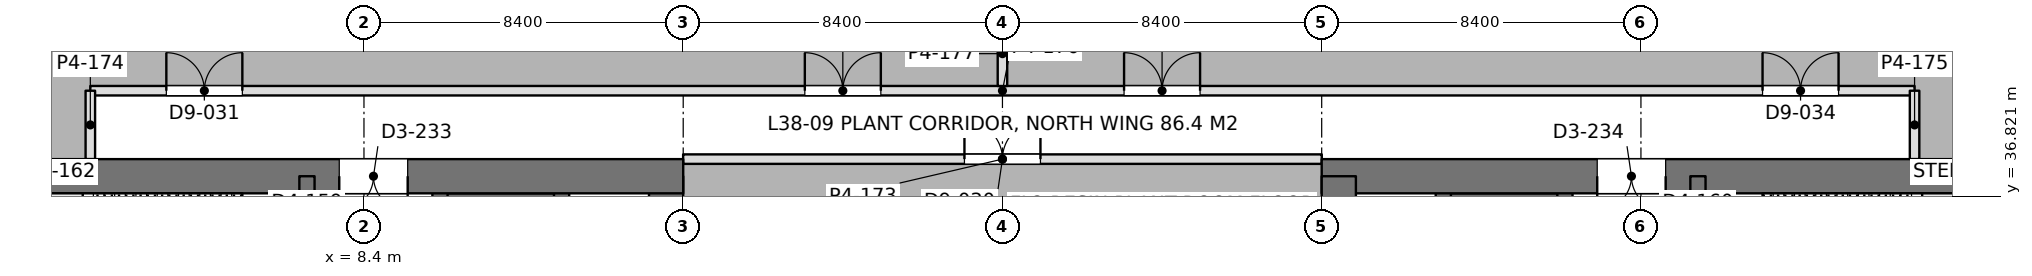
"""IFC4 building model, lengths in metres.
Left out: names, types, materials, properties, quantities, classifications, styles, units other than length and angle.
Written with IfcOpenShell. Run it as: python <this file> out.ifc"""

import sys

from ifc_helpers import new_model, si_unit, direction, frame, frame_2d, origin, place, context, subcontext, project, spatial, rectangle, extrude, element, fill, save


model = new_model("IFC4")
c1 = context("Model", 3, precision=1e-05, world=origin(), true_north=direction((0.0, 1.0)))
c2 = subcontext(c1, "Body", "Model", "MODEL_VIEW")
j1 = project(units=[si_unit("LENGTHUNIT", "METRE"), si_unit("PLANEANGLEUNIT", "RADIAN")], contexts=[c1])
p1 = place(None, origin())
s1 = spatial("IfcSite", under=j1, at=p1, CompositionType="ELEMENT")
p2 = place(p1, origin())
s2 = spatial("IfcBuilding", under=s1, at=p2, CompositionType="ELEMENT")
p3 = place(p2, frame((0.0, 0.0, 168.0)))
s3 = spatial("IfcBuildingStorey", under=s2, at=p3, CompositionType="ELEMENT", Elevation=168.0)
p4 = place(p3, frame((-1.2, 37.35, 0.0), z_axis=(0.0, 0.0, 1.0), x_axis=(1.0, 0.0, 0.0)))
e1 = element("IfcWall", 1, at=p4, inside=s3, PredefinedType="SHEAR", context=c2, shape_type="SweptSolid", body=[
    extrude(rectangle(XDim=18.0, YDim=0.9, at=frame_2d((9.0, 0.0))), origin(), (0.0, 0.0, 1.0), 5.4),
])
p5 = place(p4, frame((8.95, 0.0, 0.0)))
e2 = element("IfcOpeningElement", 2, at=p5, cuts=e1, PredefinedType="OPENING", context=c2, shape_type="SweptSolid", body=[
    extrude(rectangle(XDim=1.8, YDim=2.4, at=frame_2d((0.9, 1.2))), frame((0.0, 0.46, 0.0), z_axis=(0.0, -1.0, 0.0), x_axis=(1.0, 0.0, 0.0)), (0.0, 0.0, 1.0), 0.92),
])
p6 = place(p3, frame((16.35, 22.1, 0.0), z_axis=(0.0, 0.0, 1.0), x_axis=(0.0, 1.0, 0.0)))
e3 = element("IfcWall", 3, at=p6, inside=s3, PredefinedType="SHEAR", context=c2, shape_type="SweptSolid", body=[
    extrude(rectangle(XDim=15.25, YDim=0.9, at=frame_2d((7.625, 0.0))), origin(), (0.0, 0.0, 1.0), 5.4),
])
p7 = place(p3, frame((6.9, 13.05, 0.0), z_axis=(0.0, 0.0, 1.0), x_axis=(0.0, 1.0, 0.0)))
e4 = element("IfcWall", 4, at=p7, inside=s3, PredefinedType="SHEAR", context=c2, shape_type="SweptSolid", body=[
    extrude(rectangle(XDim=24.3, YDim=0.4, at=frame_2d((12.15, 0.0))), origin(), (0.0, 0.0, 1.0), 5.4),
])
p8 = place(p7, frame((1.3, 0.0, 0.0)))
e5 = element("IfcOpeningElement", 5, at=p8, cuts=e4, PredefinedType="OPENING", context=c2, shape_type="SweptSolid", body=[
    extrude(rectangle(XDim=1.0, YDim=2.2, at=frame_2d((0.5, 1.1))), frame((0.0, 0.21, 0.0), z_axis=(0.0, -1.0, 0.0), x_axis=(1.0, 0.0, 0.0)), (0.0, 0.0, 1.0), 0.42),
])
p9 = place(p7, frame((22.0, 0.0, 0.0)))
e6 = element("IfcOpeningElement", 6, at=p9, cuts=e4, PredefinedType="OPENING", context=c2, shape_type="SweptSolid", body=[
    extrude(rectangle(XDim=1.0, YDim=2.2, at=frame_2d((0.5, 1.1))), frame((0.0, 0.21, 0.0), z_axis=(0.0, -1.0, 0.0), x_axis=(1.0, 0.0, 0.0)), (0.0, 0.0, 1.0), 0.42),
])
p10 = place(p7, frame((5.55, 0.0, 0.0)))
e7 = element("IfcOpeningElement", 7, at=p10, cuts=e4, PredefinedType="OPENING", context=c2, shape_type="SweptSolid", body=[
    extrude(rectangle(XDim=1.0, YDim=2.2, at=frame_2d((0.5, 1.1))), frame((0.0, 0.21, 0.0), z_axis=(0.0, -1.0, 0.0), x_axis=(1.0, 0.0, 0.0)), (0.0, 0.0, 1.0), 0.42),
])
p11 = place(p7, frame((9.55, 0.0, 0.0)))
e8 = element("IfcOpeningElement", 8, at=p11, cuts=e4, PredefinedType="OPENING", context=c2, shape_type="SweptSolid", body=[
    extrude(rectangle(XDim=1.0, YDim=2.2, at=frame_2d((0.5, 1.1))), frame((0.0, 0.21, 0.0), z_axis=(0.0, -1.0, 0.0), x_axis=(1.0, 0.0, 0.0)), (0.0, 0.0, 1.0), 0.42),
])
p12 = place(p7, frame((12.8, 0.0, 0.0)))
e9 = element("IfcOpeningElement", 9, at=p12, cuts=e4, PredefinedType="OPENING", context=c2, shape_type="SweptSolid", body=[
    extrude(rectangle(XDim=1.1, YDim=2.2, at=frame_2d((0.55, 1.1))), frame((0.0, 0.21, 0.0), z_axis=(0.0, -1.0, 0.0), x_axis=(1.0, 0.0, 0.0)), (0.0, 0.0, 1.0), 0.42),
])
p13 = place(p7, frame((15.538, 0.0, 0.0)))
e10 = element("IfcOpeningElement", 10, at=p13, cuts=e4, PredefinedType="OPENING", context=c2, shape_type="SweptSolid", body=[
    extrude(rectangle(XDim=1.1, YDim=2.2, at=frame_2d((0.55, 1.1))), frame((0.0, 0.21, 0.0), z_axis=(0.0, -1.0, 0.0), x_axis=(1.0, 0.0, 0.0)), (0.0, 0.0, 1.0), 0.42),
])
p14 = place(p7, frame((18.262, 0.0, 0.0)))
e11 = element("IfcOpeningElement", 11, at=p14, cuts=e4, PredefinedType="OPENING", context=c2, shape_type="SweptSolid", body=[
    extrude(rectangle(XDim=1.1, YDim=2.2, at=frame_2d((0.55, 1.1))), frame((0.0, 0.21, 0.0), z_axis=(0.0, -1.0, 0.0), x_axis=(1.0, 0.0, 0.0)), (0.0, 0.0, 1.0), 0.42),
])
p15 = place(p3, frame((10.4, 13.05, 0.0), z_axis=(0.0, 0.0, 1.0), x_axis=(0.0, 1.0, 0.0)))
e12 = element("IfcWall", 12, at=p15, inside=s3, PredefinedType="SHEAR", context=c2, shape_type="SweptSolid", body=[
    extrude(rectangle(XDim=24.3, YDim=0.4, at=frame_2d((12.15, 0.0))), origin(), (0.0, 0.0, 1.0), 5.4),
])
p16 = place(p15, frame((10.05, 0.0, 0.0)))
e13 = element("IfcOpeningElement", 13, at=p16, cuts=e12, PredefinedType="OPENING", context=c2, shape_type="SweptSolid", body=[
    extrude(rectangle(XDim=1.1, YDim=2.2, at=frame_2d((0.55, 1.1))), frame((0.0, 0.21, 0.0), z_axis=(0.0, -1.0, 0.0), x_axis=(1.0, 0.0, 0.0)), (0.0, 0.0, 1.0), 0.42),
])
p17 = place(p15, frame((12.9, 0.0, 0.0)))
e14 = element("IfcOpeningElement", 14, at=p17, cuts=e12, PredefinedType="OPENING", context=c2, shape_type="SweptSolid", body=[
    extrude(rectangle(XDim=1.1, YDim=2.2, at=frame_2d((0.55, 1.1))), frame((0.0, 0.21, 0.0), z_axis=(0.0, -1.0, 0.0), x_axis=(1.0, 0.0, 0.0)), (0.0, 0.0, 1.0), 0.42),
])
p18 = place(p15, frame((21.45, 0.0, 0.0)))
e15 = element("IfcOpeningElement", 15, at=p18, cuts=e12, PredefinedType="OPENING", context=c2, shape_type="SweptSolid", body=[
    extrude(rectangle(XDim=1.1, YDim=2.2, at=frame_2d((0.55, 1.1))), frame((0.0, 0.21, 0.0), z_axis=(0.0, -1.0, 0.0), x_axis=(1.0, 0.0, 0.0)), (0.0, 0.0, 1.0), 0.42),
])
p19 = place(p15, frame((5.8, 0.0, 0.0)))
e16 = element("IfcOpeningElement", 16, at=p19, cuts=e12, PredefinedType="OPENING", context=c2, shape_type="SweptSolid", body=[
    extrude(rectangle(XDim=1.8, YDim=2.4, at=frame_2d((0.9, 1.2))), frame((0.0, 0.21, 0.0), z_axis=(0.0, -1.0, 0.0), x_axis=(1.0, 0.0, 0.0)), (0.0, 0.0, 1.0), 0.42),
])
p20 = place(p15, frame((1.05, 0.0, 0.0)))
e17 = element("IfcOpeningElement", 17, at=p20, cuts=e12, PredefinedType="OPENING", context=c2, shape_type="SweptSolid", body=[
    extrude(rectangle(XDim=1.8, YDim=2.4, at=frame_2d((0.9, 1.2))), frame((0.0, 0.21, 0.0), z_axis=(0.0, -1.0, 0.0), x_axis=(1.0, 0.0, 0.0)), (0.0, 0.0, 1.0), 0.42),
])
p21 = place(p3, frame((13.6, 22.225, 0.0), z_axis=(0.0, 0.0, 1.0), x_axis=(0.0, 1.0, 0.0)))
e18 = element("IfcWall", 18, at=p21, inside=s3, PredefinedType="SHEAR", context=c2, shape_type="SweptSolid", body=[
    extrude(rectangle(XDim=15.125, YDim=0.4, at=frame_2d((7.562, 0.0))), origin(), (0.0, 0.0, 1.0), 5.4),
])
p22 = place(p3, frame((10.4, 36.625, 0.0), z_axis=(0.0, 0.0, 1.0), x_axis=(1.0, 0.0, 0.0)))
e19 = element("IfcWall", 19, at=p22, inside=s3, PredefinedType="SHEAR", context=c2, shape_type="SweptSolid", body=[
    extrude(rectangle(XDim=3.2, YDim=0.55, at=frame_2d((1.6, 0.0))), origin(), (0.0, 0.0, 1.0), 5.4),
])
p23 = place(p3, frame((33.6, 37.35, 0.0), z_axis=(0.0, 0.0, 1.0), x_axis=(1.0, 0.0, 0.0)))
e20 = element("IfcWall", 20, at=p23, inside=s3, PredefinedType="SHEAR", context=c2, shape_type="SweptSolid", body=[
    extrude(rectangle(XDim=18.0, YDim=0.9, at=frame_2d((9.0, 0.0))), origin(), (0.0, 0.0, 1.0), 5.4),
])
p24 = place(p23, frame((7.25, 0.0, 0.0)))
e21 = element("IfcOpeningElement", 21, at=p24, cuts=e20, PredefinedType="OPENING", context=c2, shape_type="SweptSolid", body=[
    extrude(rectangle(XDim=1.8, YDim=2.4, at=frame_2d((0.9, 1.2))), frame((0.0, 0.46, 0.0), z_axis=(0.0, -1.0, 0.0), x_axis=(1.0, 0.0, 0.0)), (0.0, 0.0, 1.0), 0.92),
])
p25 = place(p3, frame((34.05, 22.1, 0.0), z_axis=(0.0, 0.0, 1.0), x_axis=(0.0, 1.0, 0.0)))
e22 = element("IfcWall", 22, at=p25, inside=s3, PredefinedType="SHEAR", context=c2, shape_type="SweptSolid", body=[
    extrude(rectangle(XDim=15.25, YDim=0.9, at=frame_2d((7.625, 0.0))), origin(), (0.0, 0.0, 1.0), 5.4),
])
p26 = place(p3, frame((43.5, 13.05, 0.0), z_axis=(0.0, 0.0, 1.0), x_axis=(0.0, 1.0, 0.0)))
e23 = element("IfcWall", 23, at=p26, inside=s3, PredefinedType="SHEAR", context=c2, shape_type="SweptSolid", body=[
    extrude(rectangle(XDim=24.3, YDim=0.4, at=frame_2d((12.15, 0.0))), origin(), (0.0, 0.0, 1.0), 5.4),
])
p27 = place(p26, frame((1.3, 0.0, 0.0)))
e24 = element("IfcOpeningElement", 24, at=p27, cuts=e23, PredefinedType="OPENING", context=c2, shape_type="SweptSolid", body=[
    extrude(rectangle(XDim=1.0, YDim=2.2, at=frame_2d((0.5, 1.1))), frame((0.0, 0.21, 0.0), z_axis=(0.0, -1.0, 0.0), x_axis=(1.0, 0.0, 0.0)), (0.0, 0.0, 1.0), 0.42),
])
p28 = place(p26, frame((22.0, 0.0, 0.0)))
e25 = element("IfcOpeningElement", 25, at=p28, cuts=e23, PredefinedType="OPENING", context=c2, shape_type="SweptSolid", body=[
    extrude(rectangle(XDim=1.0, YDim=2.2, at=frame_2d((0.5, 1.1))), frame((0.0, 0.21, 0.0), z_axis=(0.0, -1.0, 0.0), x_axis=(1.0, 0.0, 0.0)), (0.0, 0.0, 1.0), 0.42),
])
p29 = place(p26, frame((5.55, 0.0, 0.0)))
e26 = element("IfcOpeningElement", 26, at=p29, cuts=e23, PredefinedType="OPENING", context=c2, shape_type="SweptSolid", body=[
    extrude(rectangle(XDim=1.0, YDim=2.2, at=frame_2d((0.5, 1.1))), frame((0.0, 0.21, 0.0), z_axis=(0.0, -1.0, 0.0), x_axis=(1.0, 0.0, 0.0)), (0.0, 0.0, 1.0), 0.42),
])
p30 = place(p26, frame((9.55, 0.0, 0.0)))
e27 = element("IfcOpeningElement", 27, at=p30, cuts=e23, PredefinedType="OPENING", context=c2, shape_type="SweptSolid", body=[
    extrude(rectangle(XDim=1.0, YDim=2.2, at=frame_2d((0.5, 1.1))), frame((0.0, 0.21, 0.0), z_axis=(0.0, -1.0, 0.0), x_axis=(1.0, 0.0, 0.0)), (0.0, 0.0, 1.0), 0.42),
])
p31 = place(p26, frame((12.8, 0.0, 0.0)))
e28 = element("IfcOpeningElement", 28, at=p31, cuts=e23, PredefinedType="OPENING", context=c2, shape_type="SweptSolid", body=[
    extrude(rectangle(XDim=1.1, YDim=2.2, at=frame_2d((0.55, 1.1))), frame((0.0, 0.21, 0.0), z_axis=(0.0, -1.0, 0.0), x_axis=(1.0, 0.0, 0.0)), (0.0, 0.0, 1.0), 0.42),
])
p32 = place(p26, frame((15.538, 0.0, 0.0)))
e29 = element("IfcOpeningElement", 29, at=p32, cuts=e23, PredefinedType="OPENING", context=c2, shape_type="SweptSolid", body=[
    extrude(rectangle(XDim=1.1, YDim=2.2, at=frame_2d((0.55, 1.1))), frame((0.0, 0.21, 0.0), z_axis=(0.0, -1.0, 0.0), x_axis=(1.0, 0.0, 0.0)), (0.0, 0.0, 1.0), 0.42),
])
p33 = place(p26, frame((18.262, 0.0, 0.0)))
e30 = element("IfcOpeningElement", 30, at=p33, cuts=e23, PredefinedType="OPENING", context=c2, shape_type="SweptSolid", body=[
    extrude(rectangle(XDim=1.1, YDim=2.2, at=frame_2d((0.55, 1.1))), frame((0.0, 0.21, 0.0), z_axis=(0.0, -1.0, 0.0), x_axis=(1.0, 0.0, 0.0)), (0.0, 0.0, 1.0), 0.42),
])
p34 = place(p3, frame((40.0, 13.05, 0.0), z_axis=(0.0, 0.0, 1.0), x_axis=(0.0, 1.0, 0.0)))
e31 = element("IfcWall", 31, at=p34, inside=s3, PredefinedType="SHEAR", context=c2, shape_type="SweptSolid", body=[
    extrude(rectangle(XDim=24.3, YDim=0.4, at=frame_2d((12.15, 0.0))), origin(), (0.0, 0.0, 1.0), 5.4),
])
p35 = place(p34, frame((10.05, 0.0, 0.0)))
e32 = element("IfcOpeningElement", 32, at=p35, cuts=e31, PredefinedType="OPENING", context=c2, shape_type="SweptSolid", body=[
    extrude(rectangle(XDim=1.1, YDim=2.2, at=frame_2d((0.55, 1.1))), frame((0.0, 0.21, 0.0), z_axis=(0.0, -1.0, 0.0), x_axis=(1.0, 0.0, 0.0)), (0.0, 0.0, 1.0), 0.42),
])
p36 = place(p34, frame((12.9, 0.0, 0.0)))
e33 = element("IfcOpeningElement", 33, at=p36, cuts=e31, PredefinedType="OPENING", context=c2, shape_type="SweptSolid", body=[
    extrude(rectangle(XDim=1.1, YDim=2.2, at=frame_2d((0.55, 1.1))), frame((0.0, 0.21, 0.0), z_axis=(0.0, -1.0, 0.0), x_axis=(1.0, 0.0, 0.0)), (0.0, 0.0, 1.0), 0.42),
])
p37 = place(p34, frame((21.45, 0.0, 0.0)))
e34 = element("IfcOpeningElement", 34, at=p37, cuts=e31, PredefinedType="OPENING", context=c2, shape_type="SweptSolid", body=[
    extrude(rectangle(XDim=1.1, YDim=2.2, at=frame_2d((0.55, 1.1))), frame((0.0, 0.21, 0.0), z_axis=(0.0, -1.0, 0.0), x_axis=(1.0, 0.0, 0.0)), (0.0, 0.0, 1.0), 0.42),
])
p38 = place(p34, frame((6.1, 0.0, 0.0)))
e35 = element("IfcOpeningElement", 35, at=p38, cuts=e31, PredefinedType="OPENING", context=c2, shape_type="SweptSolid", body=[
    extrude(rectangle(XDim=1.8, YDim=2.4, at=frame_2d((0.9, 1.2))), frame((0.0, 0.21, 0.0), z_axis=(0.0, -1.0, 0.0), x_axis=(1.0, 0.0, 0.0)), (0.0, 0.0, 1.0), 0.42),
])
p39 = place(p34, frame((1.35, 0.0, 0.0)))
e36 = element("IfcOpeningElement", 36, at=p39, cuts=e31, PredefinedType="OPENING", context=c2, shape_type="SweptSolid", body=[
    extrude(rectangle(XDim=1.8, YDim=2.4, at=frame_2d((0.9, 1.2))), frame((0.0, 0.21, 0.0), z_axis=(0.0, -1.0, 0.0), x_axis=(1.0, 0.0, 0.0)), (0.0, 0.0, 1.0), 0.42),
])
p40 = place(p3, frame((36.8, 22.225, 0.0), z_axis=(0.0, 0.0, 1.0), x_axis=(0.0, 1.0, 0.0)))
e37 = element("IfcWall", 37, at=p40, inside=s3, PredefinedType="SHEAR", context=c2, shape_type="SweptSolid", body=[
    extrude(rectangle(XDim=15.125, YDim=0.4, at=frame_2d((7.562, 0.0))), origin(), (0.0, 0.0, 1.0), 5.4),
])
p41 = place(p3, frame((40.0, 36.625, 0.0), z_axis=(0.0, 0.0, 1.0), x_axis=(-1.0, 0.0, 0.0)))
e38 = element("IfcWall", 38, at=p41, inside=s3, PredefinedType="SHEAR", context=c2, shape_type="SweptSolid", body=[
    extrude(rectangle(XDim=3.2, YDim=0.55, at=frame_2d((1.6, 0.0))), origin(), (0.0, 0.0, 1.0), 5.4),
])
p42 = place(p3, frame((1.2, 39.6, 0.0), z_axis=(0.0, 0.0, 1.0), x_axis=(1.0, 0.0, 0.0)))
e39 = element("IfcWall", 39, at=p42, inside=s3, PredefinedType="PARTITIONING", context=c2, shape_type="SweptSolid", body=[
    extrude(rectangle(XDim=48.0, YDim=0.25, at=frame_2d((24.0, 0.0))), origin(), (0.0, 0.0, 1.0), 4.725),
])
p43 = place(p42, frame((2.0, 0.0, 0.0)))
e40 = element("IfcOpeningElement", 40, at=p43, cuts=e39, PredefinedType="OPENING", context=c2, shape_type="SweptSolid", body=[
    extrude(rectangle(XDim=2.0, YDim=2.4, at=frame_2d((1.0, 1.2))), frame((0.0, 0.135, 0.0), z_axis=(0.0, -1.0, 0.0), x_axis=(1.0, 0.0, 0.0)), (0.0, 0.0, 1.0), 0.27),
])
p44 = place(p42, frame((18.8, 0.0, 0.0)))
e41 = element("IfcOpeningElement", 41, at=p44, cuts=e39, PredefinedType="OPENING", context=c2, shape_type="SweptSolid", body=[
    extrude(rectangle(XDim=2.0, YDim=2.4, at=frame_2d((1.0, 1.2))), frame((0.0, 0.135, 0.0), z_axis=(0.0, -1.0, 0.0), x_axis=(1.0, 0.0, 0.0)), (0.0, 0.0, 1.0), 0.27),
])
p45 = place(p42, frame((27.2, 0.0, 0.0)))
e42 = element("IfcOpeningElement", 42, at=p45, cuts=e39, PredefinedType="OPENING", context=c2, shape_type="SweptSolid", body=[
    extrude(rectangle(XDim=2.0, YDim=2.4, at=frame_2d((1.0, 1.2))), frame((0.0, 0.135, 0.0), z_axis=(0.0, -1.0, 0.0), x_axis=(1.0, 0.0, 0.0)), (0.0, 0.0, 1.0), 0.27),
])
p46 = place(p42, frame((44.0, 0.0, 0.0)))
e43 = element("IfcOpeningElement", 43, at=p46, cuts=e39, PredefinedType="OPENING", context=c2, shape_type="SweptSolid", body=[
    extrude(rectangle(XDim=2.0, YDim=2.4, at=frame_2d((1.0, 1.2))), frame((0.0, 0.135, 0.0), z_axis=(0.0, -1.0, 0.0), x_axis=(1.0, 0.0, 0.0)), (0.0, 0.0, 1.0), 0.27),
])
for number, where, z_axis, x_axis in (
    (44, (1.2, 37.8, 0.0), (0.0, 0.0, 1.0), (0.0, 1.0, 0.0)),
    (45, (49.2, 37.8, 0.0), (0.0, 0.0, 1.0), (0.0, 1.0, 0.0)),
):
    element("IfcWall", number, at=place(p3, frame(where, z_axis=z_axis, x_axis=x_axis)), inside=s3, PredefinedType="PARTITIONING", context=c2, shape_type="SweptSolid", body=[
        extrude(rectangle(XDim=1.8, YDim=0.25, at=frame_2d((0.9, 0.0))), origin(), (0.0, 0.0, 1.0), 5.25),
    ])
p47 = place(p3, frame((25.2, 39.724, 0.0), z_axis=(0.0, 0.0, 1.0), x_axis=(0.0, 1.0, 0.0)))
e46 = element("IfcWall", 46, at=p47, inside=s3, PredefinedType="PARTITIONING", context=c2, shape_type="SweptSolid", body=[
    extrude(rectangle(XDim=1.702, YDim=0.25, at=frame_2d((0.851, 0.0))), origin(), (0.0, 0.0, 1.0), 4.75),
])
p48 = place(p3, frame((16.798, 37.8, 0.0), z_axis=(0.0, 0.0, 1.0), x_axis=(1.0, 0.0, 0.0)))
e47 = element("IfcWall", 47, at=p48, inside=s3, PredefinedType="PARTITIONING", context=c2, shape_type="SweptSolid", body=[
    extrude(rectangle(XDim=16.804, YDim=0.25, at=frame_2d((8.402, 0.0))), origin(), (0.0, 0.0, 1.0), 4.725),
])
p49 = place(p48, frame((7.402, 0.0, 0.0)))
e48 = element("IfcOpeningElement", 48, at=p49, cuts=e47, PredefinedType="OPENING", context=c2, shape_type="SweptSolid", body=[
    extrude(rectangle(XDim=2.0, YDim=2.4, at=frame_2d((1.0, 1.2))), frame((0.0, 0.135, 0.0), z_axis=(0.0, -1.0, 0.0), x_axis=(1.0, 0.0, 0.0)), (0.0, 0.0, 1.0), 0.27),
])
p50 = place(p5, frame((1.8, 0.0, 0.0), z_axis=(0.0, 0.0, 1.0), x_axis=(-1.0, 0.0, 0.0)))
e49 = element("IfcDoor", 49, at=p50, inside=s3, OperationType="DOUBLE_DOOR_SINGLE_SWING", PredefinedType="DOOR", context=c2, shape_type="SweptSolid", body=[
    extrude(rectangle(XDim=1.8, YDim=2.4, at=frame_2d((0.9, 1.2))), frame((0.0, 0.025, 0.0), z_axis=(0.0, -1.0, 0.0), x_axis=(1.0, 0.0, 0.0)), (0.0, 0.0, 1.0), 0.05),
])
fill(e2, e49)
p51 = place(p24, frame((1.8, 0.0, 0.0), z_axis=(0.0, 0.0, 1.0), x_axis=(-1.0, 0.0, 0.0)))
e50 = element("IfcDoor", 50, at=p51, inside=s3, OperationType="DOUBLE_DOOR_SINGLE_SWING", PredefinedType="DOOR", context=c2, shape_type="SweptSolid", body=[
    extrude(rectangle(XDim=1.8, YDim=2.4, at=frame_2d((0.9, 1.2))), frame((0.0, 0.025, 0.0), z_axis=(0.0, -1.0, 0.0), x_axis=(1.0, 0.0, 0.0)), (0.0, 0.0, 1.0), 0.05),
])
fill(e21, e50)
p52 = place(p43, origin())
e51 = element("IfcDoor", 51, at=p52, inside=s3, OperationType="DOUBLE_DOOR_SINGLE_SWING", PredefinedType="DOOR", context=c2, shape_type="SweptSolid", body=[
    extrude(rectangle(XDim=2.0, YDim=2.4, at=frame_2d((1.0, 1.2))), frame((0.0, 0.025, 0.0), z_axis=(0.0, -1.0, 0.0), x_axis=(1.0, 0.0, 0.0)), (0.0, 0.0, 1.0), 0.05),
])
fill(e40, e51)
p53 = place(p44, origin())
e52 = element("IfcDoor", 52, at=p53, inside=s3, OperationType="DOUBLE_DOOR_SINGLE_SWING", PredefinedType="DOOR", context=c2, shape_type="SweptSolid", body=[
    extrude(rectangle(XDim=2.0, YDim=2.4, at=frame_2d((1.0, 1.2))), frame((0.0, 0.025, 0.0), z_axis=(0.0, -1.0, 0.0), x_axis=(1.0, 0.0, 0.0)), (0.0, 0.0, 1.0), 0.05),
])
fill(e41, e52)
p54 = place(p45, origin())
e53 = element("IfcDoor", 53, at=p54, inside=s3, OperationType="DOUBLE_DOOR_SINGLE_SWING", PredefinedType="DOOR", context=c2, shape_type="SweptSolid", body=[
    extrude(rectangle(XDim=2.0, YDim=2.4, at=frame_2d((1.0, 1.2))), frame((0.0, 0.025, 0.0), z_axis=(0.0, -1.0, 0.0), x_axis=(1.0, 0.0, 0.0)), (0.0, 0.0, 1.0), 0.05),
])
fill(e42, e53)
p55 = place(p46, origin())
e54 = element("IfcDoor", 54, at=p55, inside=s3, OperationType="DOUBLE_DOOR_SINGLE_SWING", PredefinedType="DOOR", context=c2, shape_type="SweptSolid", body=[
    extrude(rectangle(XDim=2.0, YDim=2.4, at=frame_2d((1.0, 1.2))), frame((0.0, 0.025, 0.0), z_axis=(0.0, -1.0, 0.0), x_axis=(1.0, 0.0, 0.0)), (0.0, 0.0, 1.0), 0.05),
])
fill(e43, e54)
p56 = place(p49, origin())
e55 = element("IfcDoor", 55, at=p56, inside=s3, OperationType="DOUBLE_DOOR_SINGLE_SWING", PredefinedType="DOOR", context=c2, shape_type="SweptSolid", body=[
    extrude(rectangle(XDim=2.0, YDim=2.4, at=frame_2d((1.0, 1.2))), frame((0.0, 0.025, 0.0), z_axis=(0.0, -1.0, 0.0), x_axis=(1.0, 0.0, 0.0)), (0.0, 0.0, 1.0), 0.05),
])
fill(e48, e55)
save(model, sys.argv[1])
